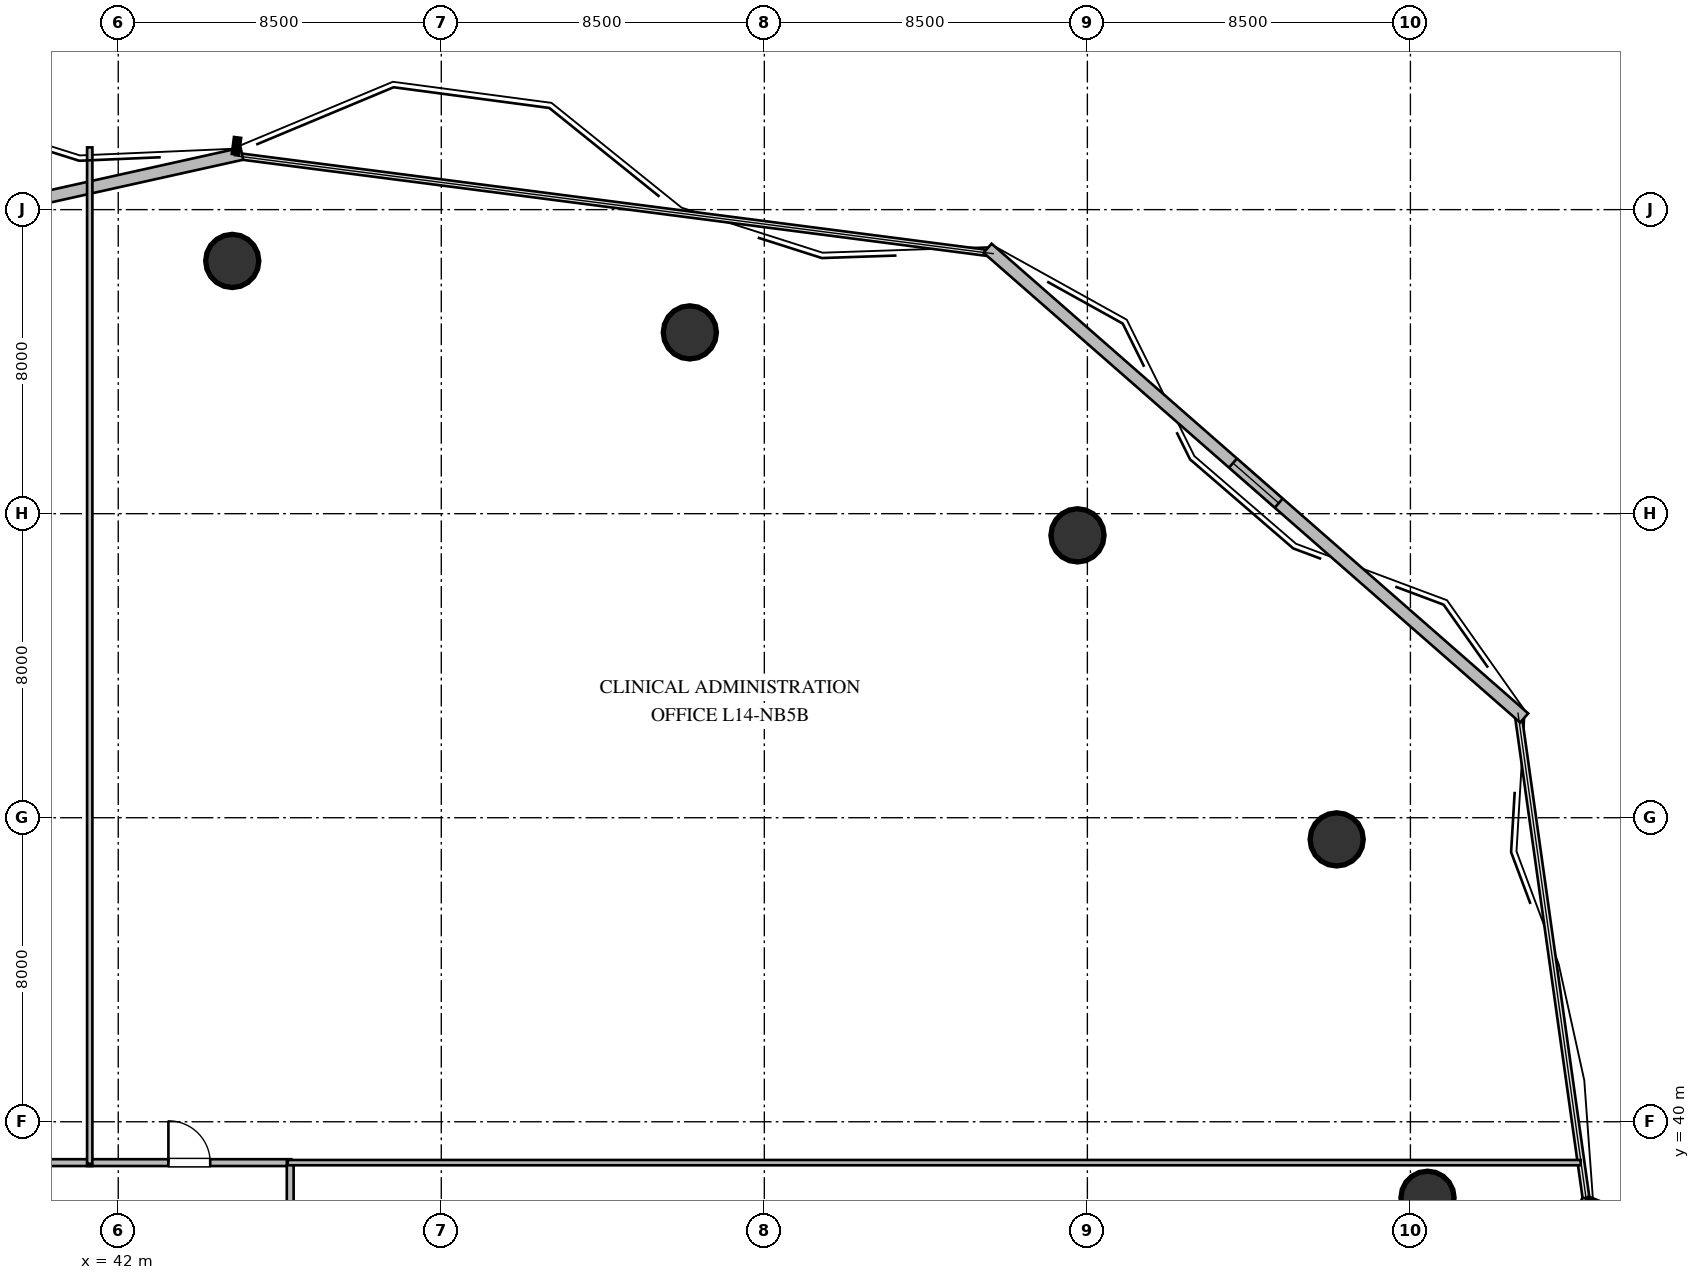
"""IFC4 building model, lengths in metres.
Left out: names, types, materials, properties, quantities, classifications, styles, units other than length and angle.
Written with IfcOpenShell. Run it as: python <this file> out.ifc"""

import sys

from ifc_helpers import new_model, si_unit, direction, frame, frame_2d, origin, origin_2d, place, context, subcontext, project, spatial, rectangle, circle, extrude, element, fill, save


model = new_model("IFC4")
c1 = context("Model", 3, precision=1e-05, world=origin(), true_north=direction((0.0, 1.0)))
c2 = subcontext(c1, "Body", "Model", "MODEL_VIEW")
j1 = project(units=[si_unit("LENGTHUNIT", "METRE"), si_unit("PLANEANGLEUNIT", "RADIAN")], contexts=[c1])
p1 = place(None, origin())
s1 = spatial("IfcSite", under=j1, at=p1, CompositionType="ELEMENT")
p2 = place(p1, origin())
s2 = spatial("IfcBuilding", under=s1, at=p2, CompositionType="ELEMENT")
p3 = place(p2, frame((0.0, 0.0, 56.4)))
s3 = spatial("IfcBuildingStorey", under=s2, at=p3, CompositionType="ELEMENT", Elevation=56.4)
for number, where, z_axis, x_axis in (
    (1, (76.45, 38.0, 0.0), (0.0, 0.0, 1.0), (1.0, 0.0, 0.0)),
    (2, (74.06, 47.43, 0.0), (0.0, 0.0, 1.0), (1.0, 0.0, 0.0)),
    (3, (67.24, 55.43, 0.0), (0.0, 0.0, 1.0), (1.0, 0.0, 0.0)),
    (4, (57.04, 60.77, 0.0), (0.0, 0.0, 1.0), (1.0, 0.0, 0.0)),
    (5, (45.0, 62.65, 0.0), (0.0, 0.0, 1.0), (1.0, 0.0, 0.0)),
):
    element("IfcColumn", number, at=place(p3, frame(where, z_axis=z_axis, x_axis=x_axis)), inside=s3, PredefinedType="COLUMN", context=c2, shape_type="SweptSolid", body=[
        extrude(circle(Radius=0.7, at=origin_2d()), origin(), (0.0, 0.0, 1.0), 3.6),
    ])
p4 = place(p3, frame((25.78, 61.144, 0.0), z_axis=(0.0, 0.0, 1.0), x_axis=(0.976206349039, 0.216843639742, 0.0)))
e6 = element("IfcWall", 6, at=p4, inside=s3, PredefinedType="STANDARD", context=c2, shape_type="SweptSolid", body=[
    extrude(rectangle(XDim=19.949, YDim=0.32, at=frame_2d((9.975, 0.0))), origin(), (0.0, 0.0, 1.0), 3.36),
])
p5 = place(p4, frame((9.175, 0.0, 1.05)))
e7 = element("IfcOpeningElement", 7, at=p5, cuts=e6, PredefinedType="OPENING", context=c2, shape_type="SweptSolid", body=[
    extrude(rectangle(XDim=1.6, YDim=1.5, at=frame_2d((0.8, 0.75))), frame((0.0, 0.17, 0.0), z_axis=(0.0, -1.0, 0.0), x_axis=(1.0, 0.0, 0.0)), (0.0, 0.0, 1.0), 0.34),
])
p6 = place(p3, frame((64.874, 62.984, 0.0), z_axis=(0.0, 0.0, 1.0), x_axis=(0.752445311183, -0.658654730249, 0.0)))
e8 = element("IfcWall", 8, at=p6, inside=s3, PredefinedType="STANDARD", context=c2, shape_type="SweptSolid", body=[
    extrude(rectangle(XDim=18.765, YDim=0.32, at=frame_2d((9.383, 0.0))), origin(), (0.0, 0.0, 1.0), 3.36),
])
p7 = place(p6, frame((8.582, 0.0, 1.05)))
e9 = element("IfcOpeningElement", 9, at=p7, cuts=e8, PredefinedType="OPENING", context=c2, shape_type="SweptSolid", body=[
    extrude(rectangle(XDim=1.6, YDim=1.5, at=frame_2d((0.8, 0.75))), frame((0.0, 0.17, 0.0), z_axis=(0.0, -1.0, 0.0), x_axis=(1.0, 0.0, 0.0)), (0.0, 0.0, 1.0), 0.34),
])
p8 = place(p3, frame((37.435, 38.925, 0.0), z_axis=(0.0, 0.0, 1.0), x_axis=(1.0, 0.0, 0.0)))
e10 = element("IfcWall", 10, at=p8, inside=s3, PredefinedType="PARTITIONING", context=c2, shape_type="SweptSolid", body=[
    extrude(rectangle(XDim=3.88, YDim=0.18, at=frame_2d((1.94, 0.0))), origin(), (0.0, 0.0, 1.0), 3.36),
])
p9 = place(p8, frame((1.39, 0.0, 0.0)))
e11 = element("IfcOpeningElement", 11, at=p9, cuts=e10, PredefinedType="OPENING", context=c2, shape_type="SweptSolid", body=[
    extrude(rectangle(XDim=1.1, YDim=2.1, at=frame_2d((0.55, 1.05))), frame((0.0, 0.1, 0.0), z_axis=(0.0, -1.0, 0.0), x_axis=(1.0, 0.0, 0.0)), (0.0, 0.0, 1.0), 0.2),
])
p10 = place(p3, frame((41.185, 38.925, 0.0), z_axis=(0.0, 0.0, 1.0), x_axis=(1.0, 0.0, 0.0)))
e12 = element("IfcWall", 12, at=p10, inside=s3, PredefinedType="PARTITIONING", context=c2, shape_type="SweptSolid", body=[
    extrude(rectangle(XDim=5.37, YDim=0.18, at=frame_2d((2.685, 0.0))), origin(), (0.0, 0.0, 1.0), 3.36),
])
p11 = place(p10, frame((2.135, 0.0, 0.0)))
e13 = element("IfcOpeningElement", 13, at=p11, cuts=e12, PredefinedType="OPENING", context=c2, shape_type="SweptSolid", body=[
    extrude(rectangle(XDim=1.1, YDim=2.1, at=frame_2d((0.55, 1.05))), frame((0.0, 0.1, 0.0), z_axis=(0.0, -1.0, 0.0), x_axis=(1.0, 0.0, 0.0)), (0.0, 0.0, 1.0), 0.2),
])
p12 = place(p3, frame((46.525, 38.955, 0.0), z_axis=(0.0, 0.0, 1.0), x_axis=(0.0, -1.0, 0.0)))
e14 = element("IfcWall", 14, at=p12, inside=s3, PredefinedType="PARTITIONING", context=c2, shape_type="SweptSolid", body=[
    extrude(rectangle(XDim=5.56, YDim=0.18, at=frame_2d((2.78, 0.0))), origin(), (0.0, 0.0, 1.0), 3.36),
])
p13 = place(p12, frame((2.23, 0.0, 0.0)))
e15 = element("IfcOpeningElement", 15, at=p13, cuts=e14, PredefinedType="OPENING", context=c2, shape_type="SweptSolid", body=[
    extrude(rectangle(XDim=1.1, YDim=2.1, at=frame_2d((0.55, 1.05))), frame((0.0, 0.1, 0.0), z_axis=(0.0, -1.0, 0.0), x_axis=(1.0, 0.0, 0.0)), (0.0, 0.0, 1.0), 0.2),
])
p14 = place(p3, frame((41.25, 65.638, 0.0), z_axis=(0.0, 0.0, 1.0), x_axis=(0.0, -1.0, 0.0)))
e16 = element("IfcWall", 16, at=p14, inside=s3, PredefinedType="PARTITIONING", context=c2, shape_type="SweptSolid", body=[
    extrude(rectangle(XDim=26.743, YDim=0.14, at=frame_2d((13.372, 0.0))), origin(), (0.0, 0.0, 1.0), 3.36),
])
p15 = place(p3, frame((80.48, 38.925, 0.0), z_axis=(0.0, 0.0, 1.0), x_axis=(-1.0, 0.0, 0.0)))
e17 = element("IfcWall", 17, at=p15, inside=s3, PredefinedType="PARTITIONING", context=c2, shape_type="SweptSolid", body=[
    extrude(rectangle(XDim=34.02, YDim=0.14, at=frame_2d((17.01, 0.0))), origin(), (0.0, 0.0, 1.0), 3.36),
])
p16 = place(p7, origin())
e18 = element("IfcWindow", 18, at=p16, inside=s3, PartitioningType="SINGLE_PANEL", PredefinedType="WINDOW", context=c2, shape_type="SweptSolid", body=[
    extrude(rectangle(XDim=1.6, YDim=1.5, at=frame_2d((0.8, 0.75))), frame((0.0, 0.03, 0.0), z_axis=(0.0, -1.0, 0.0), x_axis=(1.0, 0.0, 0.0)), (0.0, 0.0, 1.0), 0.06),
])
fill(e9, e18)
p17 = place(p11, origin())
e19 = element("IfcDoor", 19, at=p17, inside=s3, OperationType="SINGLE_SWING_LEFT", PredefinedType="DOOR", context=c2, shape_type="SweptSolid", body=[
    extrude(rectangle(XDim=1.1, YDim=2.1, at=frame_2d((0.55, 1.05))), frame((0.0, 0.025, 0.0), z_axis=(0.0, -1.0, 0.0), x_axis=(1.0, 0.0, 0.0)), (0.0, 0.0, 1.0), 0.05),
])
fill(e13, e19)
save(model, sys.argv[1])
